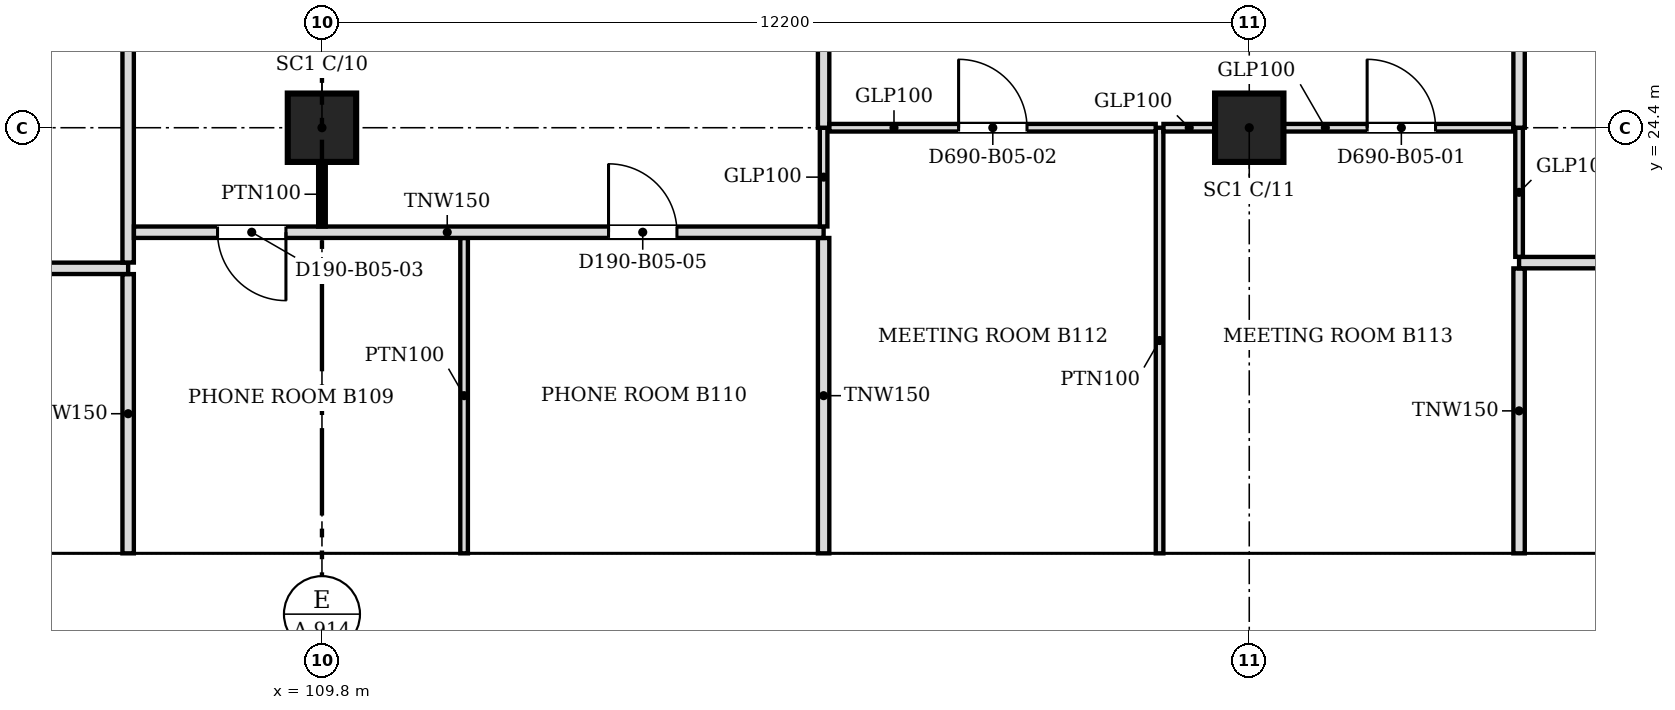
"""IFC4 building model, lengths in metres.
Left out: names, types, materials, properties, quantities, classifications, styles, units other than length and angle.
Written with IfcOpenShell. Run it as: python <this file> out.ifc"""

import sys

from ifc_helpers import new_model, si_unit, direction, frame, frame_2d, origin, origin_2d, place, context, subcontext, project, spatial, polyline, rectangle, outline, extrude, faceted_brep, source, transform, mapped, element, fill, save


model = new_model("IFC4")
c1 = context("Model", 3, precision=1e-05, world=origin(), true_north=direction((0.0, 1.0)))
c2 = subcontext(c1, "Body", "Model", "MODEL_VIEW")
j1 = project(units=[si_unit("LENGTHUNIT", "METRE"), si_unit("PLANEANGLEUNIT", "RADIAN")], contexts=[c1])
p1 = place(None, origin())
s1 = spatial("IfcSite", under=j1, at=p1, CompositionType="ELEMENT")
p2 = place(p1, origin())
s2 = spatial("IfcBuilding", under=s1, at=p2, CompositionType="ELEMENT")
p3 = place(p2, frame((0.0, 0.0, 48.6)))
s3 = spatial("IfcBuildingStorey", under=s2, at=p3, CompositionType="ELEMENT", Elevation=48.6)
for number, where, z_axis, x_axis in (
    (1, (109.8, 24.4, 0.0), (0.0, 0.0, 1.0), (1.0, 0.0, 0.0)),
    (2, (122.0, 24.4, 0.0), (0.0, 0.0, 1.0), (1.0, 0.0, 0.0)),
):
    element("IfcColumn", number, at=place(p3, frame(where, z_axis=z_axis, x_axis=x_axis)), inside=s3, PredefinedType="COLUMN", context=c2, shape_type="SweptSolid", body=[
        extrude(rectangle(XDim=0.9, YDim=0.9, at=origin_2d()), origin(), (0.0, 0.0, 1.0), 3.6),
    ])
m1 = source(origin(), c2, "Body", "SweptSolid", [
    extrude(outline(polyline([(3.05, 0.0), (6.1, 3.8), (3.05, 7.6), (0.0, 3.8), (3.05, 0.0)])), frame((0.0, 0.25, 0.0), z_axis=(0.0, -1.0, 0.0), x_axis=(1.0, 0.0, 0.0)), (0.0, 0.0, 1.0), 0.5),
])
p4 = place(p3, frame((100.65, 18.55, -3.8), z_axis=(0.0, 0.0, 1.0), x_axis=(1.0, 0.0, 0.0)))
e3 = element("IfcWall", 3, at=p4, inside=s3, PredefinedType="SOLIDWALL", context=c2, shape_type="MappedRepresentation", body=[
    mapped(m1, transform((0.0, 0.0, 0.0), scale=1.0)),
])
m2 = source(origin(), c2, "Body", "SweptSolid", [
    extrude(outline(polyline([(3.05, 0.399), (5.78, 3.8), (3.05, 7.2), (0.321, 3.8), (3.05, 0.399)])), frame((0.0, 0.26, 0.0), z_axis=(0.0, -1.0, 0.0), x_axis=(1.0, 0.0, 0.0)), (0.0, 0.0, 1.0), 0.52),
])
p5 = place(p4, origin())
e4 = element("IfcOpeningElement", 4, at=p5, cuts=e3, PredefinedType="OPENING", context=c2, shape_type="MappedRepresentation", body=[
    mapped(m2, transform((0.0, 0.0, 0.0), scale=1.0)),
])
p6 = place(p3, frame((106.75, 18.55, -3.8), z_axis=(0.0, 0.0, 1.0), x_axis=(1.0, 0.0, 0.0)))
e5 = element("IfcWall", 5, at=p6, inside=s3, PredefinedType="SOLIDWALL", context=c2, shape_type="MappedRepresentation", body=[
    mapped(m1, transform((0.0, 0.0, 0.0), scale=1.0)),
])
p7 = place(p6, origin())
e6 = element("IfcOpeningElement", 6, at=p7, cuts=e5, PredefinedType="OPENING", context=c2, shape_type="MappedRepresentation", body=[
    mapped(m2, transform((0.0, 0.0, 0.0), scale=1.0)),
])
m3 = source(origin(), c2, "Body", "Brep", [
    faceted_brep([(3.05, -0.25, 0.0), (6.1, -0.25, 3.8), (6.1, -0.25, 3.8), (3.05, -0.25, 7.6), (0.0, -0.25, 3.8), (0.0, 0.25, 3.8), (3.05, 0.25, 7.6), (6.1, 0.25, 3.8), (6.1, 0.25, 3.8), (3.05, 0.25, 0.0)], [[[0, 1, 2, 3, 4]], [[5, 6, 7, 8, 9]], [[9, 8, 1, 0]], [[7, 6, 3, 2]], [[6, 5, 4, 3]], [[5, 9, 0, 4]], [[1, 8, 7, 2]]]),
])
p8 = place(p3, frame((112.85, 18.55, -3.8), z_axis=(0.0, 0.0, 1.0), x_axis=(1.0, 0.0, 0.0)))
e7 = element("IfcWall", 7, at=p8, inside=s3, PredefinedType="SOLIDWALL", context=c2, shape_type="MappedRepresentation", body=[
    mapped(m3, transform((0.0, 0.0, 0.0), scale=1.0)),
])
p9 = place(p8, origin())
e8 = element("IfcOpeningElement", 8, at=p9, cuts=e7, PredefinedType="OPENING", context=c2, shape_type="MappedRepresentation", body=[
    mapped(m2, transform((0.0, 0.0, 0.0), scale=1.0)),
])
p10 = place(p3, frame((118.95, 18.55, -3.8), z_axis=(0.0, 0.0, 1.0), x_axis=(1.0, 0.0, 0.0)))
e9 = element("IfcWall", 9, at=p10, inside=s3, PredefinedType="SOLIDWALL", context=c2, shape_type="MappedRepresentation", body=[
    mapped(m1, transform((0.0, 0.0, 0.0), scale=1.0)),
])
p11 = place(p10, origin())
e10 = element("IfcOpeningElement", 10, at=p11, cuts=e9, PredefinedType="OPENING", context=c2, shape_type="MappedRepresentation", body=[
    mapped(m2, transform((0.0, 0.0, 0.0), scale=1.0)),
])
m4 = source(origin(), c2, "Body", "Brep", [
    faceted_brep([(3.003, -0.25, 0.0), (3.05, -0.25, 0.06), (3.05, -0.25, 7.54), (3.003, -0.25, 7.6), (0.0, -0.25, 3.8), (0.0, 0.25, 3.8), (2.957, 0.25, 7.541), (2.957, 0.25, 0.059), (3.003, 0.0, 0.0), (3.003, 0.0, 7.6)], [[[0, 1, 2, 3, 4]], [[5, 6, 7]], [[1, 0, 8]], [[9, 3, 2]], [[6, 5, 4, 3, 9]], [[5, 7, 8, 0, 4]], [[1, 8, 7, 6, 9, 2]]]),
])
p12 = place(p3, frame((125.05, 18.55, -3.8), z_axis=(0.0, 0.0, 1.0), x_axis=(1.0, 0.0, 0.0)))
e11 = element("IfcWall", 11, at=p12, inside=s3, PredefinedType="SOLIDWALL", context=c2, shape_type="MappedRepresentation", body=[
    mapped(m4, transform((0.0, 0.0, 0.0), scale=1.0)),
])
m5 = source(origin(), c2, "Body", "SweptSolid", [
    extrude(outline(polyline([(2.803, 6.944), (0.319, 3.8), (2.803, 0.656), (2.803, 6.944)])), frame((0.0, 0.26, 0.0), z_axis=(0.0, -1.0, 0.0), x_axis=(1.0, 0.0, 0.0)), (0.0, 0.0, 1.0), 0.52),
])
p13 = place(p12, origin())
e12 = element("IfcOpeningElement", 12, at=p13, cuts=e11, PredefinedType="OPENING", context=c2, shape_type="MappedRepresentation", body=[
    mapped(m5, transform((0.0, 0.0, 0.0), scale=1.0)),
])
p14 = place(p2, frame((0.0, 0.0, 52.4)))
s4 = spatial("IfcBuildingStorey", under=s2, at=p14, CompositionType="ELEMENT", Elevation=52.4)
m6 = source(origin(), c2, "Body", "SweptSolid", [
    extrude(outline(polyline([(3.05, 0.0), (6.1, 3.8), (3.05, 7.6), (0.0, 3.8), (3.05, 0.0)])), frame((0.0, 0.25, 0.0), z_axis=(0.0, -1.0, 0.0), x_axis=(1.0, 0.0, 0.0)), (0.0, 0.0, 1.0), 0.5),
])
p15 = place(p14, frame((103.7, 18.55, -3.8), z_axis=(0.0, 0.0, 1.0), x_axis=(1.0, 0.0, 0.0)))
e13 = element("IfcWall", 13, at=p15, inside=s4, PredefinedType="SOLIDWALL", context=c2, shape_type="MappedRepresentation", body=[
    mapped(m6, transform((0.0, 0.0, 0.0), scale=1.0)),
])
m7 = source(origin(), c2, "Body", "SweptSolid", [
    extrude(outline(polyline([(3.05, 0.399), (5.78, 3.8), (3.05, 7.2), (0.321, 3.8), (3.05, 0.399)])), frame((0.0, 0.26, 0.0), z_axis=(0.0, -1.0, 0.0), x_axis=(1.0, 0.0, 0.0)), (0.0, 0.0, 1.0), 0.52),
])
p16 = place(p15, origin())
e14 = element("IfcOpeningElement", 14, at=p16, cuts=e13, PredefinedType="OPENING", context=c2, shape_type="MappedRepresentation", body=[
    mapped(m7, transform((0.0, 0.0, 0.0), scale=1.0)),
])
m8 = source(origin(), c2, "Body", "Brep", [
    faceted_brep([(3.05, -0.25, 0.0), (6.1, -0.25, 3.8), (6.1, -0.25, 3.8), (3.05, -0.25, 7.6), (0.0, -0.25, 3.8), (0.0, 0.25, 3.8), (3.05, 0.25, 7.6), (6.1, 0.25, 3.8), (6.1, 0.25, 3.8), (3.05, 0.25, 0.0)], [[[0, 1, 2, 3, 4]], [[5, 6, 7, 8, 9]], [[9, 8, 1, 0]], [[7, 6, 3, 2]], [[6, 5, 4, 3]], [[5, 9, 0, 4]], [[1, 8, 7, 2]]]),
])
p17 = place(p14, frame((109.8, 18.55, -3.8), z_axis=(0.0, 0.0, 1.0), x_axis=(1.0, 0.0, 0.0)))
e15 = element("IfcWall", 15, at=p17, inside=s4, PredefinedType="SOLIDWALL", context=c2, shape_type="MappedRepresentation", body=[
    mapped(m8, transform((0.0, 0.0, 0.0), scale=1.0)),
])
p18 = place(p17, origin())
e16 = element("IfcOpeningElement", 16, at=p18, cuts=e15, PredefinedType="OPENING", context=c2, shape_type="MappedRepresentation", body=[
    mapped(m7, transform((0.0, 0.0, 0.0), scale=1.0)),
])
p19 = place(p14, frame((115.9, 18.55, -3.8), z_axis=(0.0, 0.0, 1.0), x_axis=(1.0, 0.0, 0.0)))
e17 = element("IfcWall", 17, at=p19, inside=s4, PredefinedType="SOLIDWALL", context=c2, shape_type="MappedRepresentation", body=[
    mapped(m6, transform((0.0, 0.0, 0.0), scale=1.0)),
])
p20 = place(p19, origin())
e18 = element("IfcOpeningElement", 18, at=p20, cuts=e17, PredefinedType="OPENING", context=c2, shape_type="MappedRepresentation", body=[
    mapped(m7, transform((0.0, 0.0, 0.0), scale=1.0)),
])
m9 = source(origin(), c2, "Body", "Brep", [
    faceted_brep([(3.05, -0.25, 0.0), (6.053, -0.25, 3.8), (3.05, -0.25, 7.6), (0.0, -0.25, 3.8), (0.0, 0.25, 3.8), (3.05, 0.25, 7.6), (6.007, 0.25, 3.859), (6.007, 0.25, 3.741), (3.05, 0.25, 0.0), (6.053, 0.0, 3.8)], [[[0, 1, 2, 3]], [[4, 5, 6, 7, 8]], [[8, 7, 9, 1, 0]], [[6, 5, 2, 1, 9]], [[5, 4, 3, 2]], [[4, 8, 0, 3]], [[9, 7, 6]]]),
])
p21 = place(p14, frame((122.0, 18.55, -3.8), z_axis=(0.0, 0.0, 1.0), x_axis=(1.0, 0.0, 0.0)))
e19 = element("IfcWall", 19, at=p21, inside=s4, PredefinedType="SOLIDWALL", context=c2, shape_type="MappedRepresentation", body=[
    mapped(m9, transform((0.0, 0.0, 0.0), scale=1.0)),
])
m10 = source(origin(), c2, "Body", "SweptSolid", [
    extrude(outline(polyline([(3.049, 0.401), (5.735, 3.8), (3.049, 7.199), (0.321, 3.8), (3.049, 0.401)])), frame((0.0, 0.26, 0.0), z_axis=(0.0, -1.0, 0.0), x_axis=(1.0, 0.0, 0.0)), (0.0, 0.0, 1.0), 0.52),
])
p22 = place(p21, origin())
e20 = element("IfcOpeningElement", 20, at=p22, cuts=e19, PredefinedType="OPENING", context=c2, shape_type="MappedRepresentation", body=[
    mapped(m10, transform((0.0, 0.0, 0.0), scale=1.0)),
])
p23 = place(p3, frame((107.25, 18.8, 0.0), z_axis=(0.0, 0.0, 1.0), x_axis=(0.0, 1.0, 0.0)))
e21 = element("IfcWall", 21, at=p23, inside=s3, PredefinedType="PARTITIONING", context=c2, shape_type="SweptSolid", body=[
    extrude(rectangle(XDim=3.674, YDim=0.15, at=frame_2d((1.837, 0.0))), origin(), (0.0, 0.0, 1.0), 3.067),
])
p24 = place(p3, frame((111.67, 18.8, 0.0), z_axis=(0.0, 0.0, 1.0), x_axis=(0.0, 1.0, 0.0)))
e22 = element("IfcWall", 22, at=p24, inside=s3, PredefinedType="PARTITIONING", context=c2, shape_type="SweptSolid", body=[
    extrude(rectangle(XDim=4.149, YDim=0.1, at=frame_2d((2.074, 0.0))), origin(), (0.0, 0.0, 1.0), 3.067),
])
p25 = place(p3, frame((116.4, 18.8, 0.0), z_axis=(0.0, 0.0, 1.0), x_axis=(0.0, 1.0, 0.0)))
e23 = element("IfcWall", 23, at=p25, inside=s3, PredefinedType="PARTITIONING", context=c2, shape_type="SweptSolid", body=[
    extrude(rectangle(XDim=4.149, YDim=0.15, at=frame_2d((2.074, 0.0))), origin(), (0.0, 0.0, 1.0), 3.067),
])
p26 = place(p3, frame((120.82, 18.8, 0.0), z_axis=(0.0, 0.0, 1.0), x_axis=(0.0, 1.0, 0.0)))
e24 = element("IfcWall", 24, at=p26, inside=s3, PredefinedType="PARTITIONING", context=c2, shape_type="SweptSolid", body=[
    extrude(rectangle(XDim=5.6, YDim=0.1, at=frame_2d((2.8, 0.0))), origin(), (0.0, 0.0, 1.0), 3.067),
])
p27 = place(p3, frame((125.55, 18.8, 0.0), z_axis=(0.0, 0.0, 1.0), x_axis=(0.0, 1.0, 0.0)))
e25 = element("IfcWall", 25, at=p27, inside=s3, PredefinedType="PARTITIONING", context=c2, shape_type="SweptSolid", body=[
    extrude(rectangle(XDim=3.749, YDim=0.15, at=frame_2d((1.875, 0.0))), origin(), (0.0, 0.0, 1.0), 3.067),
])
p28 = place(p3, frame((107.25, 22.55, 0.0), z_axis=(0.0, 0.0, 1.0), x_axis=(-1.0, 0.0, 0.0)))
e26 = element("IfcWall", 26, at=p28, inside=s3, PredefinedType="PARTITIONING", context=c2, shape_type="SweptSolid", body=[
    extrude(rectangle(XDim=12.124, YDim=0.15, at=frame_2d((6.062, 0.0))), origin(), (0.0, 0.0, 1.0), 3.067),
])
m11 = source(origin(), c2, "Body", "SweptSolid", [
    extrude(rectangle(XDim=0.9, YDim=2.1, at=frame_2d((0.45, 1.05))), frame((0.0, 0.085, 0.0), z_axis=(0.0, -1.0, 0.0), x_axis=(1.0, 0.0, 0.0)), (0.0, 0.0, 1.0), 0.17),
])
p29 = place(p28, frame((8.624, 0.0, 0.0)))
e27 = element("IfcOpeningElement", 27, at=p29, cuts=e26, PredefinedType="OPENING", context=c2, shape_type="MappedRepresentation", body=[
    mapped(m11, transform((0.0, 0.0, 0.0), scale=1.0)),
])
p30 = place(p28, frame((2.706, 0.0, 0.0)))
e28 = element("IfcOpeningElement", 28, at=p30, cuts=e26, PredefinedType="OPENING", context=c2, shape_type="MappedRepresentation", body=[
    mapped(m11, transform((0.0, 0.0, 0.0), scale=1.0)),
])
p31 = place(p3, frame((132.979, 22.625, 0.0), z_axis=(0.0, 0.0, 1.0), x_axis=(-1.0, 0.0, 0.0)))
e29 = element("IfcWall", 29, at=p31, inside=s3, PredefinedType="PARTITIONING", context=c2, shape_type="SweptSolid", body=[
    extrude(rectangle(XDim=7.429, YDim=0.15, at=frame_2d((3.715, 0.0))), origin(), (0.0, 0.0, 1.0), 3.067),
])
p32 = place(p31, frame((3.229, 0.0, 0.0)))
e30 = element("IfcOpeningElement", 30, at=p32, cuts=e29, PredefinedType="OPENING", context=c2, shape_type="MappedRepresentation", body=[
    mapped(m11, transform((0.0, 0.0, 0.0), scale=1.0)),
])
p33 = place(p3, frame((107.25, 22.626, 0.0), z_axis=(0.0, 0.0, 1.0), x_axis=(0.0, 1.0, 0.0)))
e31 = element("IfcWall", 31, at=p33, inside=s3, PredefinedType="PARTITIONING", context=c2, shape_type="SweptSolid", body=[
    extrude(rectangle(XDim=11.898, YDim=0.15, at=frame_2d((5.949, 0.0))), origin(), (0.0, 0.0, 1.0), 3.067),
])
p34 = place(p3, frame((125.55, 22.701, 0.0), z_axis=(0.0, 0.0, 1.0), x_axis=(0.0, 1.0, 0.0)))
e32 = element("IfcWall", 32, at=p34, inside=s3, PredefinedType="PARTITIONING", context=c2, shape_type="SweptSolid", body=[
    extrude(rectangle(XDim=1.698, YDim=0.1, at=frame_2d((0.849, 0.0))), origin(), (0.0, 0.0, 1.0), 3.067),
])
p35 = place(p3, frame((116.4, 23.025, 0.0), z_axis=(0.0, 0.0, 1.0), x_axis=(-1.0, 0.0, 0.0)))
e33 = element("IfcWall", 33, at=p35, inside=s3, PredefinedType="PARTITIONING", context=c2, shape_type="SweptSolid", body=[
    extrude(rectangle(XDim=9.074, YDim=0.15, at=frame_2d((4.537, 0.0))), origin(), (0.0, 0.0, 1.0), 3.067),
])
p36 = place(p35, frame((7.074, 0.0, 0.0)))
e34 = element("IfcOpeningElement", 34, at=p36, cuts=e33, PredefinedType="OPENING", context=c2, shape_type="MappedRepresentation", body=[
    mapped(m11, transform((0.0, 0.0, 0.0), scale=1.0)),
])
p37 = place(p35, frame((1.93, 0.0, 0.0)))
e35 = element("IfcOpeningElement", 35, at=p37, cuts=e33, PredefinedType="OPENING", context=c2, shape_type="MappedRepresentation", body=[
    mapped(m11, transform((0.0, 0.0, 0.0), scale=1.0)),
])
p38 = place(p3, frame((116.4, 23.101, 0.0), z_axis=(0.0, 0.0, 1.0), x_axis=(0.0, 1.0, 0.0)))
e36 = element("IfcWall", 36, at=p38, inside=s3, PredefinedType="PARTITIONING", context=c2, shape_type="SweptSolid", body=[
    extrude(rectangle(XDim=1.298, YDim=0.1, at=frame_2d((0.649, 0.0))), origin(), (0.0, 0.0, 1.0), 3.067),
])
p39 = place(p3, frame((109.8, 23.95, 0.0), z_axis=(0.0, 0.0, 1.0), x_axis=(0.0, -1.0, 0.0)))
e37 = element("IfcWall", 37, at=p39, inside=s3, PredefinedType="PARTITIONING", context=c2, shape_type="SweptSolid", body=[
    extrude(rectangle(XDim=0.85, YDim=0.1, at=frame_2d((0.425, 0.0))), origin(), (0.0, 0.0, 1.0), 3.067),
])
p40 = place(p3, frame((116.4, 24.4, 0.0), z_axis=(0.0, 0.0, 1.0), x_axis=(0.0, 1.0, 0.0)))
e38 = element("IfcWall", 38, at=p40, inside=s3, PredefinedType="PARTITIONING", context=c2, shape_type="SweptSolid", body=[
    extrude(rectangle(XDim=10.124, YDim=0.15, at=frame_2d((5.062, 0.0))), origin(), (0.0, 0.0, 1.0), 3.067),
])
p41 = place(p3, frame((120.769, 24.4, 0.0), z_axis=(0.0, 0.0, 1.0), x_axis=(-1.0, 0.0, 0.0)))
e39 = element("IfcWall", 39, at=p41, inside=s3, PredefinedType="PARTITIONING", context=c2, shape_type="SweptSolid", body=[
    extrude(rectangle(XDim=4.293, YDim=0.1, at=frame_2d((2.146, 0.0))), origin(), (0.0, 0.0, 1.0), 3.067),
])
m12 = source(origin(), c2, "Body", "SweptSolid", [
    extrude(rectangle(XDim=0.9, YDim=2.1, at=frame_2d((0.45, 1.05))), frame((0.0, 0.06, 0.0), z_axis=(0.0, -1.0, 0.0), x_axis=(1.0, 0.0, 0.0)), (0.0, 0.0, 1.0), 0.12),
])
p42 = place(p41, frame((1.693, 0.0, 0.0)))
e40 = element("IfcOpeningElement", 40, at=p42, cuts=e39, PredefinedType="OPENING", context=c2, shape_type="MappedRepresentation", body=[
    mapped(m12, transform((0.0, 0.0, 0.0), scale=1.0)),
])
p43 = place(p3, frame((120.871, 24.4, 0.0), z_axis=(0.0, 0.0, 1.0), x_axis=(1.0, 0.0, 0.0)))
e41 = element("IfcWall", 41, at=p43, inside=s3, PredefinedType="PARTITIONING", context=c2, shape_type="SweptSolid", body=[
    extrude(rectangle(XDim=0.678, YDim=0.1, at=frame_2d((0.339, 0.0))), origin(), (0.0, 0.0, 1.0), 3.067),
])
p44 = place(p3, frame((125.474, 24.4, 0.0), z_axis=(0.0, 0.0, 1.0), x_axis=(-1.0, 0.0, 0.0)))
e42 = element("IfcWall", 42, at=p44, inside=s3, PredefinedType="PARTITIONING", context=c2, shape_type="SweptSolid", body=[
    extrude(rectangle(XDim=3.023, YDim=0.1, at=frame_2d((1.512, 0.0))), origin(), (0.0, 0.0, 1.0), 3.067),
])
p45 = place(p44, frame((1.023, 0.0, 0.0)))
e43 = element("IfcOpeningElement", 43, at=p45, cuts=e42, PredefinedType="OPENING", context=c2, shape_type="MappedRepresentation", body=[
    mapped(m12, transform((0.0, 0.0, 0.0), scale=1.0)),
])
p46 = place(p3, frame((125.55, 24.4, 0.0), z_axis=(0.0, 0.0, 1.0), x_axis=(0.0, 1.0, 0.0)))
e44 = element("IfcWall", 44, at=p46, inside=s3, PredefinedType="PARTITIONING", context=c2, shape_type="SweptSolid", body=[
    extrude(rectangle(XDim=10.124, YDim=0.15, at=frame_2d((5.062, 0.0))), origin(), (0.0, 0.0, 1.0), 3.067),
])
m13 = source(origin(), c2, "Body", "SweptSolid", [
    extrude(rectangle(XDim=0.9, YDim=2.1, at=frame_2d((0.45, 1.05))), frame((0.0, 0.025, 0.0), z_axis=(0.0, -1.0, 0.0), x_axis=(1.0, 0.0, 0.0)), (0.0, 0.0, 1.0), 0.05),
])
p47 = place(p45, origin())
e45 = element("IfcDoor", 45, at=p47, inside=s3, OperationType="SINGLE_SWING_RIGHT", PredefinedType="DOOR", context=c2, shape_type="MappedRepresentation", body=[
    mapped(m13, transform((0.0, 0.0, 0.0), scale=1.0)),
])
fill(e43, e45)
p48 = place(p42, origin())
e46 = element("IfcDoor", 46, at=p48, inside=s3, OperationType="SINGLE_SWING_RIGHT", PredefinedType="DOOR", context=c2, shape_type="MappedRepresentation", body=[
    mapped(m13, transform((0.0, 0.0, 0.0), scale=1.0)),
])
fill(e40, e46)
p49 = place(p36, origin())
e47 = element("IfcDoor", 47, at=p49, inside=s3, OperationType="SINGLE_SWING_LEFT", PredefinedType="DOOR", context=c2, shape_type="MappedRepresentation", body=[
    mapped(m13, transform((0.0, 0.0, 0.0), scale=1.0)),
])
fill(e34, e47)
p50 = place(p37, origin())
e48 = element("IfcDoor", 48, at=p50, inside=s3, OperationType="SINGLE_SWING_RIGHT", PredefinedType="DOOR", context=c2, shape_type="MappedRepresentation", body=[
    mapped(m13, transform((0.0, 0.0, 0.0), scale=1.0)),
])
fill(e35, e48)
save(model, sys.argv[1])
